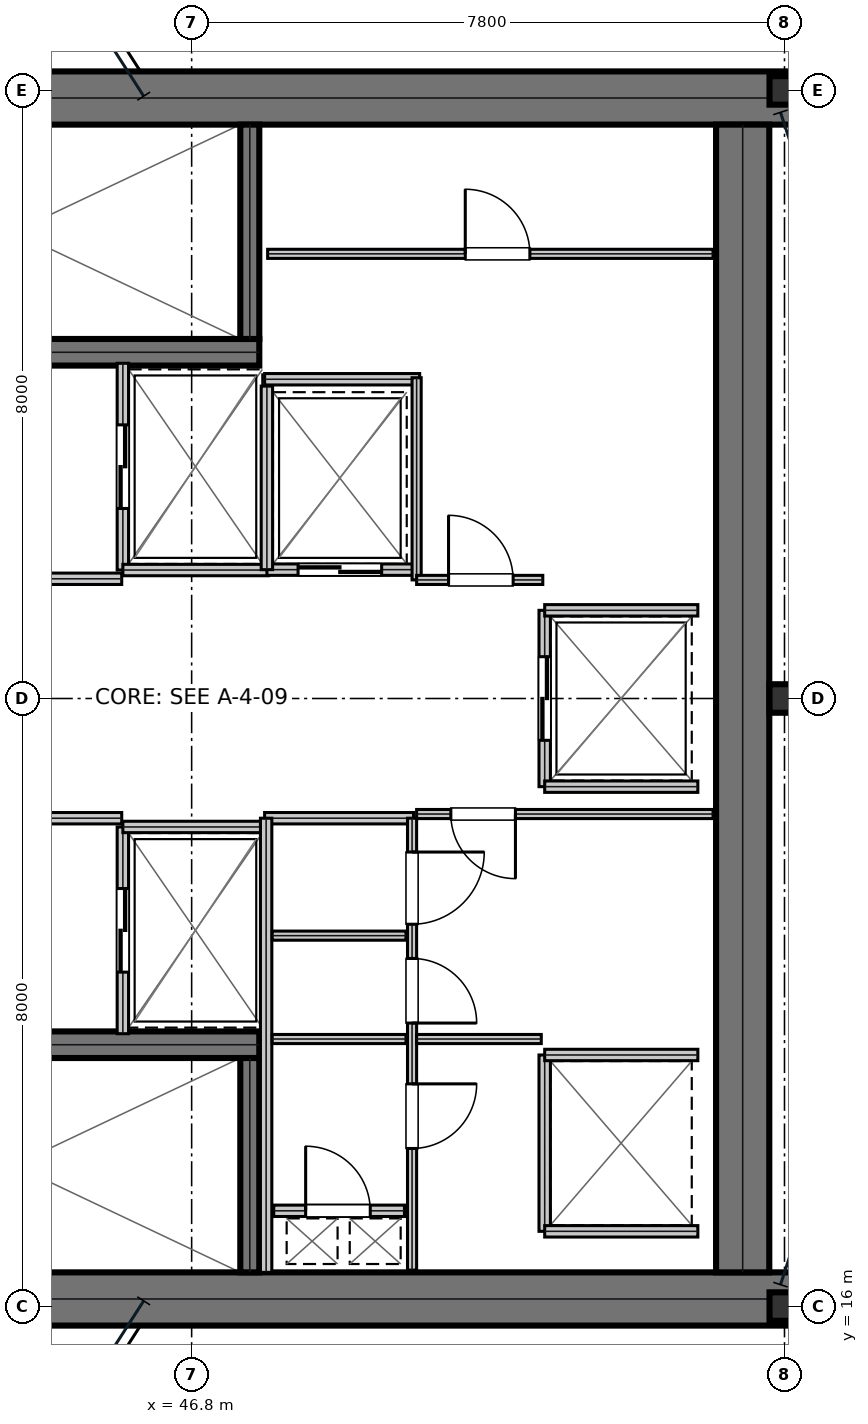
"""IFC4 building model, lengths in metres.
Left out: names, types, materials, properties, quantities, classifications, styles, units other than length and angle.
Written with IfcOpenShell. Run it as: python <this file> out.ifc"""

import sys

from ifc_helpers import new_model, si_unit, direction, frame, frame_2d, origin, origin_2d, place, context, subcontext, project, spatial, rectangle, i_section, extrude, element, fill, save


model = new_model("IFC4")
c1 = context("Model", 3, precision=1e-05, world=origin(), true_north=direction((0.0, 1.0)))
c2 = subcontext(c1, "Body", "Model", "MODEL_VIEW")
j1 = project(units=[si_unit("LENGTHUNIT", "METRE"), si_unit("PLANEANGLEUNIT", "RADIAN")], contexts=[c1])
p1 = place(None, origin())
s1 = spatial("IfcSite", under=j1, at=p1, CompositionType="ELEMENT")
p2 = place(p1, origin())
s2 = spatial("IfcBuilding", under=s1, at=p2, CompositionType="ELEMENT")
p3 = place(p2, frame((0.0, 0.0, 195.9)))
s3 = spatial("IfcBuildingStorey", under=s2, at=p3, CompositionType="ELEMENT", Elevation=195.9)
for number, where, z_axis, x_axis in (
    (1, (38.8, 31.9, 0.0), (0.0, 0.0, 1.0), (1.0, 0.0, 0.0)),
    (2, (38.8, 16.1, 0.0), (0.0, 0.0, 1.0), (1.0, 0.0, 0.0)),
):
    element("IfcWall", number, at=place(p3, frame(where, z_axis=z_axis, x_axis=x_axis)), inside=s3, PredefinedType="SHEAR", context=c2, shape_type="SweptSolid", body=[
        extrude(rectangle(XDim=16.0, YDim=0.7, at=frame_2d((8.0, 0.0))), origin(), (0.0, 0.0, 1.0), 3.79),
    ])
p4 = place(p3, frame((54.05, 16.45, 0.0), z_axis=(0.0, 0.0, 1.0), x_axis=(0.0, 1.0, 0.0)))
e3 = element("IfcWall", 3, at=p4, inside=s3, PredefinedType="SHEAR", context=c2, shape_type="SweptSolid", body=[
    extrude(rectangle(XDim=15.1, YDim=0.7, at=frame_2d((7.55, 0.0))), origin(), (0.0, 0.0, 1.0), 3.79),
])
p5 = place(p3, frame((39.98, 28.555, 0.0), z_axis=(0.0, 0.0, 1.0), x_axis=(1.0, 0.0, 0.0)))
e4 = element("IfcWall", 4, at=p5, inside=s3, PredefinedType="SHEAR", context=c2, shape_type="SweptSolid", body=[
    extrude(rectangle(XDim=7.71, YDim=0.35, at=frame_2d((3.855, 0.0))), origin(), (0.0, 0.0, 1.0), 3.79),
])
p6 = place(p5, frame((0.25, 0.0, 0.0)))
e5 = element("IfcOpeningElement", 5, at=p6, cuts=e4, PredefinedType="OPENING", context=c2, shape_type="SweptSolid", body=[
    extrude(rectangle(XDim=1.1, YDim=2.15, at=frame_2d((0.55, 1.075))), frame((0.0, 0.185, 0.0), z_axis=(0.0, -1.0, 0.0), x_axis=(1.0, 0.0, 0.0)), (0.0, 0.0, 1.0), 0.37),
])
p7 = place(p3, frame((39.98, 19.445, 0.0), z_axis=(0.0, 0.0, 1.0), x_axis=(1.0, 0.0, 0.0)))
e6 = element("IfcWall", 6, at=p7, inside=s3, PredefinedType="SHEAR", context=c2, shape_type="SweptSolid", body=[
    extrude(rectangle(XDim=7.71, YDim=0.35, at=frame_2d((3.855, 0.0))), origin(), (0.0, 0.0, 1.0), 3.79),
])
p8 = place(p7, frame((0.25, 0.0, 0.0)))
e7 = element("IfcOpeningElement", 7, at=p8, cuts=e6, PredefinedType="OPENING", context=c2, shape_type="SweptSolid", body=[
    extrude(rectangle(XDim=1.1, YDim=2.15, at=frame_2d((0.55, 1.075))), frame((0.0, 0.185, 0.0), z_axis=(0.0, -1.0, 0.0), x_axis=(1.0, 0.0, 0.0)), (0.0, 0.0, 1.0), 0.37),
])
for number, where, z_axis, x_axis in (
    (8, (47.565, 28.73, 0.0), (0.0, 0.0, 1.0), (0.0, 1.0, 0.0)),
    (9, (47.565, 16.45, 0.0), (0.0, 0.0, 1.0), (0.0, 1.0, 0.0)),
):
    element("IfcWall", number, at=place(p3, frame(where, z_axis=z_axis, x_axis=x_axis)), inside=s3, PredefinedType="SHEAR", context=c2, shape_type="SweptSolid", body=[
        extrude(rectangle(XDim=2.82, YDim=0.25, at=frame_2d((1.41, 0.0))), origin(), (0.0, 0.0, 1.0), 3.79),
    ])
for number, where, z_axis, x_axis in (
    (10, (54.6, 16.0, 0.0), (0.0, 0.0, 1.0), (1.0, 0.0, 0.0)),
    (11, (54.6, 24.0, 0.0), (0.0, 0.0, 1.0), (1.0, 0.0, 0.0)),
    (12, (54.6, 32.0, 0.0), (0.0, 0.0, 1.0), (1.0, 0.0, 0.0)),
):
    element("IfcColumn", number, at=place(p3, frame(where, z_axis=z_axis, x_axis=x_axis)), inside=s3, PredefinedType="COLUMN", context=c2, shape_type="SweptSolid", body=[
        extrude(i_section(OverallWidth=0.394, OverallDepth=0.375, WebThickness=0.017, FlangeThickness=0.028, at=origin_2d()), origin(), (0.0, 0.0, 1.0), 4.044),
    ])
p9 = place(p3, frame((39.98, 25.575, 0.0), z_axis=(0.0, 0.0, 1.0), x_axis=(1.0, 0.0, 0.0)))
e13 = element("IfcWall", 13, at=p9, inside=s3, PredefinedType="PARTITIONING", context=c2, shape_type="SweptSolid", body=[
    extrude(rectangle(XDim=5.9, YDim=0.15, at=frame_2d((2.95, 0.0))), origin(), (0.0, 0.0, 1.0), 3.79),
])
p10 = place(p9, frame((2.35, 0.0, 0.0)))
e14 = element("IfcOpeningElement", 14, at=p10, cuts=e13, PredefinedType="OPENING", context=c2, shape_type="SweptSolid", body=[
    extrude(rectangle(XDim=1.05, YDim=2.15, at=frame_2d((0.525, 1.075))), frame((0.0, 0.085, 0.0), z_axis=(0.0, -1.0, 0.0), x_axis=(1.0, 0.0, 0.0)), (0.0, 0.0, 1.0), 0.17),
])
p11 = place(p3, frame((39.98, 22.425, 0.0), z_axis=(0.0, 0.0, 1.0), x_axis=(1.0, 0.0, 0.0)))
e15 = element("IfcWall", 15, at=p11, inside=s3, PredefinedType="PARTITIONING", context=c2, shape_type="SweptSolid", body=[
    extrude(rectangle(XDim=5.9, YDim=0.15, at=frame_2d((2.95, 0.0))), origin(), (0.0, 0.0, 1.0), 3.79),
])
p12 = place(p11, frame((2.35, 0.0, 0.0)))
e16 = element("IfcOpeningElement", 16, at=p12, cuts=e15, PredefinedType="OPENING", context=c2, shape_type="SweptSolid", body=[
    extrude(rectangle(XDim=1.05, YDim=2.15, at=frame_2d((0.525, 1.075))), frame((0.0, 0.085, 0.0), z_axis=(0.0, -1.0, 0.0), x_axis=(1.0, 0.0, 0.0)), (0.0, 0.0, 1.0), 0.17),
])
p13 = place(p3, frame((45.895, 25.69, 0.0), z_axis=(0.0, 0.0, 1.0), x_axis=(0.0, 1.0, 0.0)))
e17 = element("IfcWall", 17, at=p13, inside=s3, PredefinedType="PARTITIONING", context=c2, shape_type="SweptSolid", body=[
    extrude(rectangle(XDim=2.72, YDim=0.15, at=frame_2d((1.36, 0.0))), origin(), (0.0, 0.0, 1.0), 3.79),
])
p14 = place(p13, frame((0.81, 0.0, 0.0)))
e18 = element("IfcOpeningElement", 18, at=p14, cuts=e17, PredefinedType="OPENING", context=c2, shape_type="SweptSolid", body=[
    extrude(rectangle(XDim=1.1, YDim=2.15, at=frame_2d((0.55, 1.075))), frame((0.0, 0.085, 0.0), z_axis=(0.0, -1.0, 0.0), x_axis=(1.0, 0.0, 0.0)), (0.0, 0.0, 1.0), 0.17),
])
p15 = place(p3, frame((45.895, 25.69, 0.0), z_axis=(0.0, 0.0, 1.0), x_axis=(1.0, 0.0, 0.0)))
e19 = element("IfcWall", 19, at=p15, inside=s3, PredefinedType="PARTITIONING", context=c2, shape_type="SweptSolid", body=[
    extrude(rectangle(XDim=1.915, YDim=0.15, at=frame_2d((0.958, 0.0))), origin(), (0.0, 0.0, 1.0), 3.79),
])
p16 = place(p3, frame((45.895, 19.59, 0.0), z_axis=(0.0, 0.0, 1.0), x_axis=(0.0, 1.0, 0.0)))
e20 = element("IfcWall", 20, at=p16, inside=s3, PredefinedType="PARTITIONING", context=c2, shape_type="SweptSolid", body=[
    extrude(rectangle(XDim=2.72, YDim=0.15, at=frame_2d((1.36, 0.0))), origin(), (0.0, 0.0, 1.0), 3.79),
])
p17 = place(p16, frame((0.81, 0.0, 0.0)))
e21 = element("IfcOpeningElement", 21, at=p17, cuts=e20, PredefinedType="OPENING", context=c2, shape_type="SweptSolid", body=[
    extrude(rectangle(XDim=1.1, YDim=2.15, at=frame_2d((0.55, 1.075))), frame((0.0, 0.085, 0.0), z_axis=(0.0, -1.0, 0.0), x_axis=(1.0, 0.0, 0.0)), (0.0, 0.0, 1.0), 0.17),
])
p18 = place(p3, frame((45.895, 22.31, 0.0), z_axis=(0.0, 0.0, 1.0), x_axis=(1.0, 0.0, 0.0)))
e22 = element("IfcWall", 22, at=p18, inside=s3, PredefinedType="PARTITIONING", context=c2, shape_type="SweptSolid", body=[
    extrude(rectangle(XDim=1.915, YDim=0.15, at=frame_2d((0.958, 0.0))), origin(), (0.0, 0.0, 1.0), 3.79),
])
p19 = place(p3, frame((47.79, 25.695, 0.0), z_axis=(0.0, 0.0, 1.0), x_axis=(1.0, 0.0, 0.0)))
e23 = element("IfcWall", 23, at=p19, inside=s3, PredefinedType="PARTITIONING", context=c2, shape_type="SweptSolid", body=[
    extrude(rectangle(XDim=1.92, YDim=0.15, at=frame_2d((0.96, 0.0))), origin(), (0.0, 0.0, 1.0), 3.79),
])
p20 = place(p19, frame((0.41, 0.0, 0.0)))
e24 = element("IfcOpeningElement", 24, at=p20, cuts=e23, PredefinedType="OPENING", context=c2, shape_type="SweptSolid", body=[
    extrude(rectangle(XDim=1.1, YDim=2.15, at=frame_2d((0.55, 1.075))), frame((0.0, 0.085, 0.0), z_axis=(0.0, -1.0, 0.0), x_axis=(1.0, 0.0, 0.0)), (0.0, 0.0, 1.0), 0.17),
])
p21 = place(p3, frame((47.79, 25.695, 0.0), z_axis=(0.0, 0.0, 1.0), x_axis=(0.0, 1.0, 0.0)))
e25 = element("IfcWall", 25, at=p21, inside=s3, PredefinedType="PARTITIONING", context=c2, shape_type="SweptSolid", body=[
    extrude(rectangle(XDim=2.415, YDim=0.15, at=frame_2d((1.208, 0.0))), origin(), (0.0, 0.0, 1.0), 3.79),
])
p22 = place(p3, frame((51.445, 22.84, 0.0), z_axis=(0.0, 0.0, 1.0), x_axis=(0.0, 1.0, 0.0)))
e26 = element("IfcWall", 26, at=p22, inside=s3, PredefinedType="PARTITIONING", context=c2, shape_type="SweptSolid", body=[
    extrude(rectangle(XDim=2.32, YDim=0.15, at=frame_2d((1.16, 0.0))), origin(), (0.0, 0.0, 1.0), 3.79),
])
p23 = place(p22, frame((0.61, 0.0, 0.0)))
e27 = element("IfcOpeningElement", 27, at=p23, cuts=e26, PredefinedType="OPENING", context=c2, shape_type="SweptSolid", body=[
    extrude(rectangle(XDim=1.1, YDim=2.15, at=frame_2d((0.55, 1.075))), frame((0.0, 0.085, 0.0), z_axis=(0.0, -1.0, 0.0), x_axis=(1.0, 0.0, 0.0)), (0.0, 0.0, 1.0), 0.17),
])
for number, where, z_axis, x_axis in (
    (28, (51.445, 22.84, 0.0), (0.0, 0.0, 1.0), (1.0, 0.0, 0.0)),
    (29, (51.445, 25.16, 0.0), (0.0, 0.0, 1.0), (1.0, 0.0, 0.0)),
):
    element("IfcWall", number, at=place(p3, frame(where, z_axis=z_axis, x_axis=x_axis)), inside=s3, PredefinedType="PARTITIONING", context=c2, shape_type="SweptSolid", body=[
        extrude(rectangle(XDim=2.015, YDim=0.15, at=frame_2d((1.007, 0.0))), origin(), (0.0, 0.0, 1.0), 3.79),
    ])
p24 = place(p3, frame((51.445, 16.99, 0.0), z_axis=(0.0, 0.0, 1.0), x_axis=(0.0, 1.0, 0.0)))
e30 = element("IfcWall", 30, at=p24, inside=s3, PredefinedType="PARTITIONING", context=c2, shape_type="SweptSolid", body=[
    extrude(rectangle(XDim=2.32, YDim=0.15, at=frame_2d((1.16, 0.0))), origin(), (0.0, 0.0, 1.0), 3.79),
])
for number, where, z_axis, x_axis in (
    (31, (51.445, 16.99, 0.0), (0.0, 0.0, 1.0), (1.0, 0.0, 0.0)),
    (32, (51.445, 19.31, 0.0), (0.0, 0.0, 1.0), (1.0, 0.0, 0.0)),
):
    element("IfcWall", number, at=place(p3, frame(where, z_axis=z_axis, x_axis=x_axis)), inside=s3, PredefinedType="PARTITIONING", context=c2, shape_type="SweptSolid", body=[
        extrude(rectangle(XDim=2.015, YDim=0.15, at=frame_2d((1.007, 0.0))), origin(), (0.0, 0.0, 1.0), 3.79),
    ])
p25 = place(p3, frame((47.88, 17.26, 0.0), z_axis=(0.0, 0.0, 1.0), x_axis=(1.0, 0.0, 0.0)))
e33 = element("IfcWall", 33, at=p25, inside=s3, PredefinedType="PARTITIONING", context=c2, shape_type="SweptSolid", body=[
    extrude(rectangle(XDim=1.72, YDim=0.15, at=frame_2d((0.86, 0.0))), origin(), (0.0, 0.0, 1.0), 3.79),
])
p26 = place(p25, frame((0.42, 0.0, 0.0)))
e34 = element("IfcOpeningElement", 34, at=p26, cuts=e33, PredefinedType="OPENING", context=c2, shape_type="SweptSolid", body=[
    extrude(rectangle(XDim=0.85, YDim=2.15, at=frame_2d((0.425, 1.075))), frame((0.0, 0.085, 0.0), z_axis=(0.0, -1.0, 0.0), x_axis=(1.0, 0.0, 0.0)), (0.0, 0.0, 1.0), 0.17),
])
p27 = place(p3, frame((47.76, 22.425, 0.0), z_axis=(0.0, 0.0, 1.0), x_axis=(1.0, 0.0, 0.0)))
e35 = element("IfcWall", 35, at=p27, inside=s3, PredefinedType="PARTITIONING", context=c2, shape_type="SweptSolid", body=[
    extrude(rectangle(XDim=1.96, YDim=0.15, at=frame_2d((0.98, 0.0))), origin(), (0.0, 0.0, 1.0), 3.79),
])
p28 = place(p3, frame((47.78, 16.45, 0.0), z_axis=(0.0, 0.0, 1.0), x_axis=(0.0, 1.0, 0.0)))
e36 = element("IfcWall", 36, at=p28, inside=s3, PredefinedType="PARTITIONING", context=c2, shape_type="SweptSolid", body=[
    extrude(rectangle(XDim=5.975, YDim=0.15, at=frame_2d((2.988, 0.0))), origin(), (0.0, 0.0, 1.0), 3.79),
])
for number, where, z_axis, x_axis in (
    (37, (47.86, 19.52, 0.0), (0.0, 0.0, 1.0), (1.0, 0.0, 0.0)),
    (38, (47.86, 20.88, 0.0), (0.0, 0.0, 1.0), (1.0, 0.0, 0.0)),
):
    element("IfcWall", number, at=place(p3, frame(where, z_axis=z_axis, x_axis=x_axis)), inside=s3, PredefinedType="PARTITIONING", context=c2, shape_type="SweptSolid", body=[
        extrude(rectangle(XDim=1.76, YDim=0.12, at=frame_2d((0.88, 0.0))), origin(), (0.0, 0.0, 1.0), 3.79),
    ])
p29 = place(p3, frame((49.7, 16.48, 0.0), z_axis=(0.0, 0.0, 1.0), x_axis=(0.0, 1.0, 0.0)))
e39 = element("IfcWall", 39, at=p29, inside=s3, PredefinedType="PARTITIONING", context=c2, shape_type="SweptSolid", body=[
    extrude(rectangle(XDim=5.945, YDim=0.12, at=frame_2d((2.973, 0.0))), origin(), (0.0, 0.0, 1.0), 3.79),
])
p30 = place(p29, frame((1.6, 0.0, 0.0)))
e40 = element("IfcOpeningElement", 40, at=p30, cuts=e39, PredefinedType="OPENING", context=c2, shape_type="SweptSolid", body=[
    extrude(rectangle(XDim=0.85, YDim=2.15, at=frame_2d((0.425, 1.075))), frame((0.0, 0.07, 0.0), z_axis=(0.0, -1.0, 0.0), x_axis=(1.0, 0.0, 0.0)), (0.0, 0.0, 1.0), 0.14),
])
p31 = place(p29, frame((3.25, 0.0, 0.0)))
e41 = element("IfcOpeningElement", 41, at=p31, cuts=e39, PredefinedType="OPENING", context=c2, shape_type="SweptSolid", body=[
    extrude(rectangle(XDim=0.85, YDim=2.15, at=frame_2d((0.425, 1.075))), frame((0.0, 0.07, 0.0), z_axis=(0.0, -1.0, 0.0), x_axis=(1.0, 0.0, 0.0)), (0.0, 0.0, 1.0), 0.14),
])
p32 = place(p29, frame((4.55, 0.0, 0.0)))
e42 = element("IfcOpeningElement", 42, at=p32, cuts=e39, PredefinedType="OPENING", context=c2, shape_type="SweptSolid", body=[
    extrude(rectangle(XDim=0.95, YDim=2.15, at=frame_2d((0.475, 1.075))), frame((0.0, 0.07, 0.0), z_axis=(0.0, -1.0, 0.0), x_axis=(1.0, 0.0, 0.0)), (0.0, 0.0, 1.0), 0.14),
])
p33 = place(p3, frame((49.76, 22.48, 0.0), z_axis=(0.0, 0.0, 1.0), x_axis=(1.0, 0.0, 0.0)))
e43 = element("IfcWall", 43, at=p33, inside=s3, PredefinedType="PARTITIONING", context=c2, shape_type="SweptSolid", body=[
    extrude(rectangle(XDim=3.9, YDim=0.12, at=frame_2d((1.95, 0.0))), origin(), (0.0, 0.0, 1.0), 3.79),
])
p34 = place(p33, frame((0.45, 0.0, 0.0)))
e44 = element("IfcOpeningElement", 44, at=p34, cuts=e43, PredefinedType="OPENING", context=c2, shape_type="SweptSolid", body=[
    extrude(rectangle(XDim=0.85, YDim=2.15, at=frame_2d((0.425, 1.075))), frame((0.0, 0.07, 0.0), z_axis=(0.0, -1.0, 0.0), x_axis=(1.0, 0.0, 0.0)), (0.0, 0.0, 1.0), 0.14),
])
p35 = place(p3, frame((49.76, 19.52, 0.0), z_axis=(0.0, 0.0, 1.0), x_axis=(1.0, 0.0, 0.0)))
e45 = element("IfcWall", 45, at=p35, inside=s3, PredefinedType="PARTITIONING", context=c2, shape_type="SweptSolid", body=[
    extrude(rectangle(XDim=1.64, YDim=0.12, at=frame_2d((0.82, 0.0))), origin(), (0.0, 0.0, 1.0), 3.79),
])
p36 = place(p3, frame((47.76, 28.2, 0.0), z_axis=(0.0, 0.0, 1.0), x_axis=(1.0, 0.0, 0.0)))
e46 = element("IfcWall", 46, at=p36, inside=s3, PredefinedType="PARTITIONING", context=c2, shape_type="SweptSolid", body=[
    extrude(rectangle(XDim=2.04, YDim=0.15, at=frame_2d((1.02, 0.0))), origin(), (0.0, 0.0, 1.0), 3.79),
])
p37 = place(p3, frame((49.76, 25.56, 0.0), z_axis=(0.0, 0.0, 1.0), x_axis=(0.0, 1.0, 0.0)))
e47 = element("IfcWall", 47, at=p37, inside=s3, PredefinedType="PARTITIONING", context=c2, shape_type="SweptSolid", body=[
    extrude(rectangle(XDim=2.66, YDim=0.12, at=frame_2d((1.33, 0.0))), origin(), (0.0, 0.0, 1.0), 3.79),
])
p38 = place(p3, frame((49.76, 25.56, 0.0), z_axis=(0.0, 0.0, 1.0), x_axis=(1.0, 0.0, 0.0)))
e48 = element("IfcWall", 48, at=p38, inside=s3, PredefinedType="PARTITIONING", context=c2, shape_type="SweptSolid", body=[
    extrude(rectangle(XDim=1.66, YDim=0.12, at=frame_2d((0.83, 0.0))), origin(), (0.0, 0.0, 1.0), 3.79),
])
p39 = place(p38, frame((0.42, 0.0, 0.0)))
e49 = element("IfcOpeningElement", 49, at=p39, cuts=e48, PredefinedType="OPENING", context=c2, shape_type="SweptSolid", body=[
    extrude(rectangle(XDim=0.85, YDim=2.15, at=frame_2d((0.425, 1.075))), frame((0.0, 0.07, 0.0), z_axis=(0.0, -1.0, 0.0), x_axis=(1.0, 0.0, 0.0)), (0.0, 0.0, 1.0), 0.14),
])
p40 = place(p3, frame((47.8, 29.85, 0.0), z_axis=(0.0, 0.0, 1.0), x_axis=(1.0, 0.0, 0.0)))
e50 = element("IfcWall", 50, at=p40, inside=s3, PredefinedType="PARTITIONING", context=c2, shape_type="SweptSolid", body=[
    extrude(rectangle(XDim=5.86, YDim=0.12, at=frame_2d((2.93, 0.0))), origin(), (0.0, 0.0, 1.0), 3.79),
])
p41 = place(p40, frame((2.6, 0.0, 0.0)))
e51 = element("IfcOpeningElement", 51, at=p41, cuts=e50, PredefinedType="OPENING", context=c2, shape_type="SweptSolid", body=[
    extrude(rectangle(XDim=0.85, YDim=2.15, at=frame_2d((0.425, 1.075))), frame((0.0, 0.07, 0.0), z_axis=(0.0, -1.0, 0.0), x_axis=(1.0, 0.0, 0.0)), (0.0, 0.0, 1.0), 0.14),
])
p42 = place(p14, frame((1.1, 0.0, 0.0), z_axis=(0.0, 0.0, 1.0), x_axis=(-1.0, 0.0, 0.0)))
e52 = element("IfcDoor", 52, at=p42, inside=s3, OperationType="DOUBLE_DOOR_SLIDING", PredefinedType="DOOR", context=c2, shape_type="SweptSolid", body=[
    extrude(rectangle(XDim=1.1, YDim=2.15, at=frame_2d((0.55, 1.075))), frame((0.0, 0.025, 0.0), z_axis=(0.0, -1.0, 0.0), x_axis=(1.0, 0.0, 0.0)), (0.0, 0.0, 1.0), 0.05),
])
fill(e18, e52)
p43 = place(p17, frame((1.1, 0.0, 0.0), z_axis=(0.0, 0.0, 1.0), x_axis=(-1.0, 0.0, 0.0)))
e53 = element("IfcDoor", 53, at=p43, inside=s3, OperationType="DOUBLE_DOOR_SLIDING", PredefinedType="DOOR", context=c2, shape_type="SweptSolid", body=[
    extrude(rectangle(XDim=1.1, YDim=2.15, at=frame_2d((0.55, 1.075))), frame((0.0, 0.025, 0.0), z_axis=(0.0, -1.0, 0.0), x_axis=(1.0, 0.0, 0.0)), (0.0, 0.0, 1.0), 0.05),
])
fill(e21, e53)
p44 = place(p20, frame((1.1, 0.0, 0.0), z_axis=(0.0, 0.0, 1.0), x_axis=(-1.0, 0.0, 0.0)))
e54 = element("IfcDoor", 54, at=p44, inside=s3, OperationType="DOUBLE_DOOR_SLIDING", PredefinedType="DOOR", context=c2, shape_type="SweptSolid", body=[
    extrude(rectangle(XDim=1.1, YDim=2.15, at=frame_2d((0.55, 1.075))), frame((0.0, 0.025, 0.0), z_axis=(0.0, -1.0, 0.0), x_axis=(1.0, 0.0, 0.0)), (0.0, 0.0, 1.0), 0.05),
])
fill(e24, e54)
p45 = place(p23, frame((1.1, 0.0, 0.0), z_axis=(0.0, 0.0, 1.0), x_axis=(-1.0, 0.0, 0.0)))
e55 = element("IfcDoor", 55, at=p45, inside=s3, OperationType="DOUBLE_DOOR_SLIDING", PredefinedType="DOOR", context=c2, shape_type="SweptSolid", body=[
    extrude(rectangle(XDim=1.1, YDim=2.15, at=frame_2d((0.55, 1.075))), frame((0.0, 0.025, 0.0), z_axis=(0.0, -1.0, 0.0), x_axis=(1.0, 0.0, 0.0)), (0.0, 0.0, 1.0), 0.05),
])
fill(e27, e55)
p46 = place(p26, origin())
e56 = element("IfcDoor", 56, at=p46, inside=s3, OperationType="SINGLE_SWING_LEFT", PredefinedType="TRAPDOOR", context=c2, shape_type="SweptSolid", body=[
    extrude(rectangle(XDim=0.85, YDim=2.15, at=frame_2d((0.425, 1.075))), frame((0.0, 0.025, 0.0), z_axis=(0.0, -1.0, 0.0), x_axis=(1.0, 0.0, 0.0)), (0.0, 0.0, 1.0), 0.05),
])
fill(e34, e56)
p47 = place(p30, frame((0.85, 0.0, 0.0), z_axis=(0.0, 0.0, 1.0), x_axis=(-1.0, 0.0, 0.0)))
e57 = element("IfcDoor", 57, at=p47, inside=s3, OperationType="SINGLE_SWING_LEFT", PredefinedType="DOOR", context=c2, shape_type="SweptSolid", body=[
    extrude(rectangle(XDim=0.85, YDim=2.15, at=frame_2d((0.425, 1.075))), frame((0.0, 0.025, 0.0), z_axis=(0.0, -1.0, 0.0), x_axis=(1.0, 0.0, 0.0)), (0.0, 0.0, 1.0), 0.05),
])
fill(e40, e57)
p48 = place(p31, frame((0.85, 0.0, 0.0), z_axis=(0.0, 0.0, 1.0), x_axis=(-1.0, 0.0, 0.0)))
e58 = element("IfcDoor", 58, at=p48, inside=s3, OperationType="SINGLE_SWING_RIGHT", PredefinedType="DOOR", context=c2, shape_type="SweptSolid", body=[
    extrude(rectangle(XDim=0.85, YDim=2.15, at=frame_2d((0.425, 1.075))), frame((0.0, 0.025, 0.0), z_axis=(0.0, -1.0, 0.0), x_axis=(1.0, 0.0, 0.0)), (0.0, 0.0, 1.0), 0.05),
])
fill(e41, e58)
p49 = place(p32, frame((0.95, 0.0, 0.0), z_axis=(0.0, 0.0, 1.0), x_axis=(-1.0, 0.0, 0.0)))
e59 = element("IfcDoor", 59, at=p49, inside=s3, OperationType="SINGLE_SWING_LEFT", PredefinedType="DOOR", context=c2, shape_type="SweptSolid", body=[
    extrude(rectangle(XDim=0.95, YDim=2.15, at=frame_2d((0.475, 1.075))), frame((0.0, 0.025, 0.0), z_axis=(0.0, -1.0, 0.0), x_axis=(1.0, 0.0, 0.0)), (0.0, 0.0, 1.0), 0.05),
])
fill(e42, e59)
p50 = place(p34, frame((0.85, 0.0, 0.0), z_axis=(0.0, 0.0, 1.0), x_axis=(-1.0, 0.0, 0.0)))
e60 = element("IfcDoor", 60, at=p50, inside=s3, OperationType="SINGLE_SWING_LEFT", PredefinedType="DOOR", context=c2, shape_type="SweptSolid", body=[
    extrude(rectangle(XDim=0.85, YDim=2.15, at=frame_2d((0.425, 1.075))), frame((0.0, 0.025, 0.0), z_axis=(0.0, -1.0, 0.0), x_axis=(1.0, 0.0, 0.0)), (0.0, 0.0, 1.0), 0.05),
])
fill(e44, e60)
p51 = place(p39, origin())
e61 = element("IfcDoor", 61, at=p51, inside=s3, OperationType="SINGLE_SWING_LEFT", PredefinedType="DOOR", context=c2, shape_type="SweptSolid", body=[
    extrude(rectangle(XDim=0.85, YDim=2.15, at=frame_2d((0.425, 1.075))), frame((0.0, 0.025, 0.0), z_axis=(0.0, -1.0, 0.0), x_axis=(1.0, 0.0, 0.0)), (0.0, 0.0, 1.0), 0.05),
])
fill(e49, e61)
p52 = place(p41, origin())
e62 = element("IfcDoor", 62, at=p52, inside=s3, OperationType="SINGLE_SWING_LEFT", PredefinedType="DOOR", context=c2, shape_type="SweptSolid", body=[
    extrude(rectangle(XDim=0.85, YDim=2.15, at=frame_2d((0.425, 1.075))), frame((0.0, 0.025, 0.0), z_axis=(0.0, -1.0, 0.0), x_axis=(1.0, 0.0, 0.0)), (0.0, 0.0, 1.0), 0.05),
])
fill(e51, e62)
save(model, sys.argv[1])
